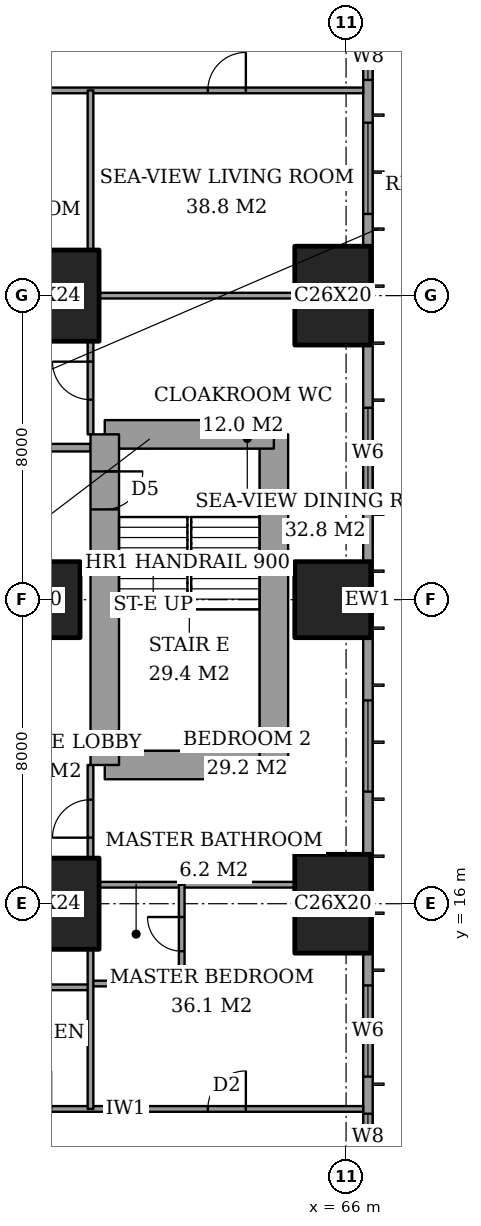
"""IFC4 building model, lengths in metres.
Left out: names, types, materials, properties, quantities, classifications, styles, units other than length and angle.
Written with IfcOpenShell. Run it as: python <this file> out.ifc"""

import sys

from ifc_helpers import new_model, si_unit, direction, frame, frame_2d, origin, origin_2d, place, context, subcontext, project, spatial, rectangle, extrude, element, fill, save


model = new_model("IFC4")
c1 = context("Model", 3, precision=1e-05, world=origin(), true_north=direction((0.0, 1.0)))
c2 = subcontext(c1, "Body", "Model", "MODEL_VIEW")
j1 = project(units=[si_unit("LENGTHUNIT", "METRE"), si_unit("PLANEANGLEUNIT", "RADIAN")], contexts=[c1])
p1 = place(None, origin())
s1 = spatial("IfcSite", under=j1, at=p1, CompositionType="ELEMENT")
p2 = place(p1, origin())
s2 = spatial("IfcBuilding", under=s1, at=p2, CompositionType="ELEMENT")
p3 = place(p2, frame((0.0, 0.0, 36.8)))
s3 = spatial("IfcBuildingStorey", under=s2, at=p3, CompositionType="ELEMENT", Elevation=36.8)
p4 = place(p3, frame((58.0, 16.0, 0.0), z_axis=(0.0, 0.0, 1.0), x_axis=(1.0, 0.0, 0.0)))
e1 = element("IfcColumn", 1, at=p4, inside=s3, PredefinedType="COLUMN", context=c2, shape_type="SweptSolid", body=[
    extrude(rectangle(XDim=3.0, YDim=2.4, at=origin_2d()), origin(), (0.0, 0.0, 1.0), 3.6),
])
p5 = place(p3, frame((58.0, 24.0, 0.0), z_axis=(0.0, 0.0, 1.0), x_axis=(1.0, 0.0, 0.0)))
e2 = element("IfcColumn", 2, at=p5, inside=s3, PredefinedType="COLUMN", context=c2, shape_type="SweptSolid", body=[
    extrude(rectangle(XDim=2.0, YDim=2.0, at=origin_2d()), origin(), (0.0, 0.0, 1.0), 3.6),
])
p6 = place(p3, frame((58.0, 32.0, 0.0), z_axis=(0.0, 0.0, 1.0), x_axis=(1.0, 0.0, 0.0)))
e3 = element("IfcColumn", 3, at=p6, inside=s3, PredefinedType="COLUMN", context=c2, shape_type="SweptSolid", body=[
    extrude(rectangle(XDim=3.0, YDim=2.4, at=origin_2d()), origin(), (0.0, 0.0, 1.0), 3.6),
])
p7 = place(p3, frame((65.65, 16.0, 0.0), z_axis=(0.0, 0.0, 1.0), x_axis=(0.0, 1.0, 0.0)))
e4 = element("IfcColumn", 4, at=p7, inside=s3, PredefinedType="COLUMN", context=c2, shape_type="SweptSolid", body=[
    extrude(rectangle(XDim=2.6, YDim=2.0, at=origin_2d()), origin(), (0.0, 0.0, 1.0), 3.6),
])
p8 = place(p3, frame((65.65, 24.0, 0.0), z_axis=(0.0, 0.0, 1.0), x_axis=(1.0, 0.0, 0.0)))
e5 = element("IfcColumn", 5, at=p8, inside=s3, PredefinedType="COLUMN", context=c2, shape_type="SweptSolid", body=[
    extrude(rectangle(XDim=2.0, YDim=2.0, at=origin_2d()), origin(), (0.0, 0.0, 1.0), 3.6),
])
p9 = place(p3, frame((65.65, 32.0, 0.0), z_axis=(0.0, 0.0, 1.0), x_axis=(0.0, 1.0, 0.0)))
e6 = element("IfcColumn", 6, at=p9, inside=s3, PredefinedType="COLUMN", context=c2, shape_type="SweptSolid", body=[
    extrude(rectangle(XDim=2.6, YDim=2.0, at=origin_2d()), origin(), (0.0, 0.0, 1.0), 3.6),
])
p10 = place(p3, frame((59.65, 19.65, 0.0), z_axis=(0.0, 0.0, 1.0), x_axis=(1.0, 0.0, 0.0)))
e7 = element("IfcWall", 7, at=p10, inside=s3, PredefinedType="SHEAR", context=c2, shape_type="SweptSolid", body=[
    extrude(rectangle(XDim=4.45, YDim=0.75, at=frame_2d((2.225, 0.0))), origin(), (0.0, 0.0, 1.0), 3.6),
])
p11 = place(p3, frame((64.1, 19.65, 0.0), z_axis=(0.0, 0.0, 1.0), x_axis=(0.0, 1.0, 0.0)))
e8 = element("IfcWall", 8, at=p11, inside=s3, PredefinedType="SHEAR", context=c2, shape_type="SweptSolid", body=[
    extrude(rectangle(XDim=8.7, YDim=0.75, at=frame_2d((4.35, 0.0))), origin(), (0.0, 0.0, 1.0), 3.6),
])
p12 = place(p3, frame((64.1, 28.35, 0.0), z_axis=(0.0, 0.0, 1.0), x_axis=(-1.0, 0.0, 0.0)))
e9 = element("IfcWall", 9, at=p12, inside=s3, PredefinedType="SHEAR", context=c2, shape_type="SweptSolid", body=[
    extrude(rectangle(XDim=4.45, YDim=0.75, at=frame_2d((2.225, 0.0))), origin(), (0.0, 0.0, 1.0), 3.6),
])
p13 = place(p3, frame((59.65, 28.35, 0.0), z_axis=(0.0, 0.0, 1.0), x_axis=(0.0, -1.0, 0.0)))
e10 = element("IfcWall", 10, at=p13, inside=s3, PredefinedType="SHEAR", context=c2, shape_type="SweptSolid", body=[
    extrude(rectangle(XDim=8.7, YDim=0.75, at=frame_2d((4.35, 0.0))), origin(), (0.0, 0.0, 1.0), 3.6),
])
p14 = place(p13, frame((0.975, 0.0, 0.0)))
e11 = element("IfcOpeningElement", 11, at=p14, cuts=e10, PredefinedType="OPENING", context=c2, shape_type="SweptSolid", body=[
    extrude(rectangle(XDim=1.0, YDim=2.1, at=frame_2d((0.5, 1.05))), frame((0.0, 0.385, 0.0), z_axis=(0.0, -1.0, 0.0), x_axis=(1.0, 0.0, 0.0)), (0.0, 0.0, 1.0), 0.77),
])
p15 = place(p3, frame((66.575, 3.175, 0.0), z_axis=(0.0, 0.0, 1.0), x_axis=(0.0, 1.0, 0.0)))
e12 = element("IfcWall", 12, at=p15, inside=s3, PredefinedType="SOLIDWALL", context=c2, shape_type="SweptSolid", body=[
    extrude(rectangle(XDim=41.65, YDim=0.25, at=frame_2d((20.825, 0.0))), origin(), (0.0, 0.0, 1.0), 3.6),
])
p16 = place(p15, frame((0.775, 0.0, 0.6)))
e13 = element("IfcOpeningElement", 13, at=p16, cuts=e12, PredefinedType="OPENING", context=c2, shape_type="SweptSolid", body=[
    extrude(rectangle(XDim=2.4, YDim=2.0, at=frame_2d((1.2, 1.0))), frame((0.0, 0.135, 0.0), z_axis=(0.0, -1.0, 0.0), x_axis=(1.0, 0.0, 0.0)), (0.0, 0.0, 1.0), 0.27),
])
p17 = place(p15, frame((6.1, 0.0, 0.6)))
e14 = element("IfcOpeningElement", 14, at=p17, cuts=e12, PredefinedType="OPENING", context=c2, shape_type="SweptSolid", body=[
    extrude(rectangle(XDim=1.2, YDim=2.0, at=frame_2d((0.6, 1.0))), frame((0.0, 0.135, 0.0), z_axis=(0.0, -1.0, 0.0), x_axis=(1.0, 0.0, 0.0)), (0.0, 0.0, 1.0), 0.27),
])
p18 = place(p15, frame((8.275, 0.0, 0.6)))
e15 = element("IfcOpeningElement", 15, at=p18, cuts=e12, PredefinedType="OPENING", context=c2, shape_type="SweptSolid", body=[
    extrude(rectangle(XDim=2.4, YDim=2.0, at=frame_2d((1.2, 1.0))), frame((0.0, 0.135, 0.0), z_axis=(0.0, -1.0, 0.0), x_axis=(1.0, 0.0, 0.0)), (0.0, 0.0, 1.0), 0.27),
])
p19 = place(p15, frame((15.775, 0.0, 0.6)))
e16 = element("IfcOpeningElement", 16, at=p19, cuts=e12, PredefinedType="OPENING", context=c2, shape_type="SweptSolid", body=[
    extrude(rectangle(XDim=2.4, YDim=2.0, at=frame_2d((1.2, 1.0))), frame((0.0, 0.135, 0.0), z_axis=(0.0, -1.0, 0.0), x_axis=(1.0, 0.0, 0.0)), (0.0, 0.0, 1.0), 0.27),
])
p20 = place(p15, frame((23.475, 0.0, 0.6)))
e17 = element("IfcOpeningElement", 17, at=p20, cuts=e12, PredefinedType="OPENING", context=c2, shape_type="SweptSolid", body=[
    extrude(rectangle(XDim=2.4, YDim=2.0, at=frame_2d((1.2, 1.0))), frame((0.0, 0.135, 0.0), z_axis=(0.0, -1.0, 0.0), x_axis=(1.0, 0.0, 0.0)), (0.0, 0.0, 1.0), 0.27),
])
p21 = place(p15, frame((30.975, 0.0, 0.6)))
e18 = element("IfcOpeningElement", 18, at=p21, cuts=e12, PredefinedType="OPENING", context=c2, shape_type="SweptSolid", body=[
    extrude(rectangle(XDim=2.4, YDim=2.0, at=frame_2d((1.2, 1.0))), frame((0.0, 0.135, 0.0), z_axis=(0.0, -1.0, 0.0), x_axis=(1.0, 0.0, 0.0)), (0.0, 0.0, 1.0), 0.27),
])
p22 = place(p15, frame((34.5, 0.0, 0.6)))
e19 = element("IfcOpeningElement", 19, at=p22, cuts=e12, PredefinedType="OPENING", context=c2, shape_type="SweptSolid", body=[
    extrude(rectangle(XDim=1.2, YDim=2.0, at=frame_2d((0.6, 1.0))), frame((0.0, 0.135, 0.0), z_axis=(0.0, -1.0, 0.0), x_axis=(1.0, 0.0, 0.0)), (0.0, 0.0, 1.0), 0.27),
])
p23 = place(p15, frame((38.475, 0.0, 0.6)))
e20 = element("IfcOpeningElement", 20, at=p23, cuts=e12, PredefinedType="OPENING", context=c2, shape_type="SweptSolid", body=[
    extrude(rectangle(XDim=2.4, YDim=2.0, at=frame_2d((1.2, 1.0))), frame((0.0, 0.135, 0.0), z_axis=(0.0, -1.0, 0.0), x_axis=(1.0, 0.0, 0.0)), (0.0, 0.0, 1.0), 0.27),
])
p24 = place(p3, frame((41.439, 10.6, 0.0), z_axis=(0.0, 0.0, 1.0), x_axis=(1.0, 0.0, 0.0)))
e21 = element("IfcWall", 21, at=p24, inside=s3, PredefinedType="PARTITIONING", context=c2, shape_type="SweptSolid", body=[
    extrude(rectangle(XDim=25.011, YDim=0.15, at=frame_2d((12.505, 0.0))), origin(), (0.0, 0.0, 1.0), 3.35),
])
p25 = place(p24, frame((10.761, 0.0, 0.0)))
e22 = element("IfcOpeningElement", 22, at=p25, cuts=e21, PredefinedType="OPENING", context=c2, shape_type="SweptSolid", body=[
    extrude(rectangle(XDim=1.0, YDim=2.1, at=frame_2d((0.5, 1.05))), frame((0.0, 0.085, 0.0), z_axis=(0.0, -1.0, 0.0), x_axis=(1.0, 0.0, 0.0)), (0.0, 0.0, 1.0), 0.17),
])
p26 = place(p24, frame((20.924, 0.0, 0.0)))
e23 = element("IfcOpeningElement", 23, at=p26, cuts=e21, PredefinedType="OPENING", context=c2, shape_type="SweptSolid", body=[
    extrude(rectangle(XDim=1.0, YDim=2.1, at=frame_2d((0.5, 1.05))), frame((0.0, 0.085, 0.0), z_axis=(0.0, -1.0, 0.0), x_axis=(1.0, 0.0, 0.0)), (0.0, 0.0, 1.0), 0.17),
])
p27 = place(p24, frame((15.799, 0.0, 0.0)))
e24 = element("IfcOpeningElement", 24, at=p27, cuts=e21, PredefinedType="OPENING", context=c2, shape_type="SweptSolid", body=[
    extrude(rectangle(XDim=1.0, YDim=2.1, at=frame_2d((0.5, 1.05))), frame((0.0, 0.085, 0.0), z_axis=(0.0, -1.0, 0.0), x_axis=(1.0, 0.0, 0.0)), (0.0, 0.0, 1.0), 0.17),
])
p28 = place(p24, frame((13.061, 0.0, 0.0)))
e25 = element("IfcOpeningElement", 25, at=p28, cuts=e21, PredefinedType="OPENING", context=c2, shape_type="SweptSolid", body=[
    extrude(rectangle(XDim=1.0, YDim=2.1, at=frame_2d((0.5, 1.05))), frame((0.0, 0.085, 0.0), z_axis=(0.0, -1.0, 0.0), x_axis=(1.0, 0.0, 0.0)), (0.0, 0.0, 1.0), 0.17),
])
p29 = place(p24, frame((7.911, 0.0, 0.0)))
e26 = element("IfcOpeningElement", 26, at=p29, cuts=e21, PredefinedType="OPENING", context=c2, shape_type="SweptSolid", body=[
    extrude(rectangle(XDim=0.9, YDim=2.1, at=frame_2d((0.45, 1.05))), frame((0.0, 0.085, 0.0), z_axis=(0.0, -1.0, 0.0), x_axis=(1.0, 0.0, 0.0)), (0.0, 0.0, 1.0), 0.17),
])
p30 = place(p24, frame((2.836, 0.0, 0.0)))
e27 = element("IfcOpeningElement", 27, at=p30, cuts=e21, PredefinedType="OPENING", context=c2, shape_type="SweptSolid", body=[
    extrude(rectangle(XDim=1.0, YDim=2.1, at=frame_2d((0.5, 1.05))), frame((0.0, 0.085, 0.0), z_axis=(0.0, -1.0, 0.0), x_axis=(1.0, 0.0, 0.0)), (0.0, 0.0, 1.0), 0.17),
])
p31 = place(p3, frame((56.2, 13.8, 0.0), z_axis=(0.0, 0.0, 1.0), x_axis=(1.0, 0.0, 0.0)))
e28 = element("IfcWall", 28, at=p31, inside=s3, PredefinedType="PARTITIONING", context=c2, shape_type="SweptSolid", body=[
    extrude(rectangle(XDim=3.075, YDim=0.15, at=frame_2d((1.538, 0.0))), origin(), (0.0, 0.0, 1.0), 3.35),
])
p32 = place(p3, frame((59.275, 13.9, 0.0), z_axis=(0.0, 0.0, 1.0), x_axis=(1.0, 0.0, 0.0)))
e29 = element("IfcWall", 29, at=p32, inside=s3, PredefinedType="PARTITIONING", context=c2, shape_type="SweptSolid", body=[
    extrude(rectangle(XDim=2.4, YDim=0.15, at=frame_2d((1.2, 0.0))), origin(), (0.0, 0.0, 1.0), 3.35),
])
p33 = place(p3, frame((59.5, 16.5, 0.0), z_axis=(0.0, 0.0, 1.0), x_axis=(1.0, 0.0, 0.0)))
e30 = element("IfcWall", 30, at=p33, inside=s3, PredefinedType="PARTITIONING", context=c2, shape_type="SweptSolid", body=[
    extrude(rectangle(XDim=5.15, YDim=0.15, at=frame_2d((2.575, 0.0))), origin(), (0.0, 0.0, 1.0), 3.35),
])
p34 = place(p3, frame((42.0, 28.0, 0.0), z_axis=(0.0, 0.0, 1.0), x_axis=(1.0, 0.0, 0.0)))
e31 = element("IfcWall", 31, at=p34, inside=s3, PredefinedType="PARTITIONING", context=c2, shape_type="SweptSolid", body=[
    extrude(rectangle(XDim=17.275, YDim=0.2, at=frame_2d((8.637, 0.0))), origin(), (0.0, 0.0, 1.0), 3.35),
])
p35 = place(p34, frame((9.4, 0.0, 0.0)))
e32 = element("IfcOpeningElement", 32, at=p35, cuts=e31, PredefinedType="OPENING", context=c2, shape_type="SweptSolid", body=[
    extrude(rectangle(XDim=1.2, YDim=2.4, at=frame_2d((0.6, 1.2))), frame((0.0, 0.11, 0.0), z_axis=(0.0, -1.0, 0.0), x_axis=(1.0, 0.0, 0.0)), (0.0, 0.0, 1.0), 0.22),
])
p36 = place(p3, frame((59.5, 32.0, 0.0), z_axis=(0.0, 0.0, 1.0), x_axis=(1.0, 0.0, 0.0)))
e33 = element("IfcWall", 33, at=p36, inside=s3, PredefinedType="PARTITIONING", context=c2, shape_type="SweptSolid", body=[
    extrude(rectangle(XDim=5.15, YDim=0.15, at=frame_2d((2.575, 0.0))), origin(), (0.0, 0.0, 1.0), 2.634),
])
p37 = place(p3, frame((41.439, 37.4, 0.0), z_axis=(0.0, 0.0, 1.0), x_axis=(1.0, 0.0, 0.0)))
e34 = element("IfcWall", 34, at=p37, inside=s3, PredefinedType="PARTITIONING", context=c2, shape_type="SweptSolid", body=[
    extrude(rectangle(XDim=25.011, YDim=0.15, at=frame_2d((12.505, 0.0))), origin(), (0.0, 0.0, 1.0), 3.35),
])
p38 = place(p37, frame((10.761, 0.0, 0.0)))
e35 = element("IfcOpeningElement", 35, at=p38, cuts=e34, PredefinedType="OPENING", context=c2, shape_type="SweptSolid", body=[
    extrude(rectangle(XDim=1.0, YDim=2.1, at=frame_2d((0.5, 1.05))), frame((0.0, 0.085, 0.0), z_axis=(0.0, -1.0, 0.0), x_axis=(1.0, 0.0, 0.0)), (0.0, 0.0, 1.0), 0.17),
])
p39 = place(p37, frame((20.924, 0.0, 0.0)))
e36 = element("IfcOpeningElement", 36, at=p39, cuts=e34, PredefinedType="OPENING", context=c2, shape_type="SweptSolid", body=[
    extrude(rectangle(XDim=1.0, YDim=2.1, at=frame_2d((0.5, 1.05))), frame((0.0, 0.085, 0.0), z_axis=(0.0, -1.0, 0.0), x_axis=(1.0, 0.0, 0.0)), (0.0, 0.0, 1.0), 0.17),
])
p40 = place(p37, frame((15.749, 0.0, 0.0)))
e37 = element("IfcOpeningElement", 37, at=p40, cuts=e34, PredefinedType="OPENING", context=c2, shape_type="SweptSolid", body=[
    extrude(rectangle(XDim=0.9, YDim=2.1, at=frame_2d((0.45, 1.05))), frame((0.0, 0.085, 0.0), z_axis=(0.0, -1.0, 0.0), x_axis=(1.0, 0.0, 0.0)), (0.0, 0.0, 1.0), 0.17),
])
p41 = place(p37, frame((12.961, 0.0, 0.0)))
e38 = element("IfcOpeningElement", 38, at=p41, cuts=e34, PredefinedType="OPENING", context=c2, shape_type="SweptSolid", body=[
    extrude(rectangle(XDim=1.0, YDim=2.1, at=frame_2d((0.5, 1.05))), frame((0.0, 0.085, 0.0), z_axis=(0.0, -1.0, 0.0), x_axis=(1.0, 0.0, 0.0)), (0.0, 0.0, 1.0), 0.17),
])
p42 = place(p37, frame((7.861, 0.0, 0.0)))
e39 = element("IfcOpeningElement", 39, at=p42, cuts=e34, PredefinedType="OPENING", context=c2, shape_type="SweptSolid", body=[
    extrude(rectangle(XDim=1.0, YDim=2.1, at=frame_2d((0.5, 1.05))), frame((0.0, 0.085, 0.0), z_axis=(0.0, -1.0, 0.0), x_axis=(1.0, 0.0, 0.0)), (0.0, 0.0, 1.0), 0.17),
])
p43 = place(p37, frame((2.836, 0.0, 0.0)))
e40 = element("IfcOpeningElement", 40, at=p43, cuts=e34, PredefinedType="OPENING", context=c2, shape_type="SweptSolid", body=[
    extrude(rectangle(XDim=1.0, YDim=2.1, at=frame_2d((0.5, 1.05))), frame((0.0, 0.085, 0.0), z_axis=(0.0, -1.0, 0.0), x_axis=(1.0, 0.0, 0.0)), (0.0, 0.0, 1.0), 0.17),
])
p44 = place(p3, frame((59.275, 10.6, 0.0), z_axis=(0.0, 0.0, 1.0), x_axis=(0.0, 1.0, 0.0)))
e41 = element("IfcWall", 41, at=p44, inside=s3, PredefinedType="PARTITIONING", context=c2, shape_type="SweptSolid", body=[
    extrude(rectangle(XDim=4.2, YDim=0.15, at=frame_2d((2.1, 0.0))), origin(), (0.0, 0.0, 1.0), 3.35),
])
p45 = place(p3, frame((59.275, 17.2, 0.0), z_axis=(0.0, 0.0, 1.0), x_axis=(0.0, 1.0, 0.0)))
e42 = element("IfcWall", 42, at=p45, inside=s3, PredefinedType="PARTITIONING", context=c2, shape_type="SweptSolid", body=[
    extrude(rectangle(XDim=2.45, YDim=0.15, at=frame_2d((1.225, 0.0))), origin(), (0.0, 0.0, 1.0), 3.35),
])
p46 = place(p45, frame((0.538, 0.0, 0.0)))
e43 = element("IfcOpeningElement", 43, at=p46, cuts=e42, PredefinedType="OPENING", context=c2, shape_type="SweptSolid", body=[
    extrude(rectangle(XDim=1.0, YDim=2.1, at=frame_2d((0.5, 1.05))), frame((0.0, 0.085, 0.0), z_axis=(0.0, -1.0, 0.0), x_axis=(1.0, 0.0, 0.0)), (0.0, 0.0, 1.0), 0.17),
])
p47 = place(p3, frame((59.275, 28.35, 0.0), z_axis=(0.0, 0.0, 1.0), x_axis=(0.0, 1.0, 0.0)))
e44 = element("IfcWall", 44, at=p47, inside=s3, PredefinedType="PARTITIONING", context=c2, shape_type="SweptSolid", body=[
    extrude(rectangle(XDim=2.45, YDim=0.15, at=frame_2d((1.225, 0.0))), origin(), (0.0, 0.0, 1.0), 3.35),
])
p48 = place(p47, frame((0.913, 0.0, 0.0)))
e45 = element("IfcOpeningElement", 45, at=p48, cuts=e44, PredefinedType="OPENING", context=c2, shape_type="SweptSolid", body=[
    extrude(rectangle(XDim=1.0, YDim=2.1, at=frame_2d((0.5, 1.05))), frame((0.0, 0.085, 0.0), z_axis=(0.0, -1.0, 0.0), x_axis=(1.0, 0.0, 0.0)), (0.0, 0.0, 1.0), 0.17),
])
p49 = place(p3, frame((59.275, 33.2, 0.0), z_axis=(0.0, 0.0, 1.0), x_axis=(0.0, 1.0, 0.0)))
e46 = element("IfcWall", 46, at=p49, inside=s3, PredefinedType="PARTITIONING", context=c2, shape_type="SweptSolid", body=[
    extrude(rectangle(XDim=4.2, YDim=0.15, at=frame_2d((2.1, 0.0))), origin(), (0.0, 0.0, 1.0), 3.35),
])
p50 = place(p3, frame((61.675, 13.9, 0.0), z_axis=(0.0, 0.0, 1.0), x_axis=(0.0, 1.0, 0.0)))
e47 = element("IfcWall", 47, at=p50, inside=s3, PredefinedType="PARTITIONING", context=c2, shape_type="SweptSolid", body=[
    extrude(rectangle(XDim=2.6, YDim=0.15, at=frame_2d((1.3, 0.0))), origin(), (0.0, 0.0, 1.0), 3.35),
])
p51 = place(p50, frame((0.85, 0.0, 0.0)))
e48 = element("IfcOpeningElement", 48, at=p51, cuts=e47, PredefinedType="OPENING", context=c2, shape_type="SweptSolid", body=[
    extrude(rectangle(XDim=0.9, YDim=2.1, at=frame_2d((0.45, 1.05))), frame((0.0, 0.085, 0.0), z_axis=(0.0, -1.0, 0.0), x_axis=(1.0, 0.0, 0.0)), (0.0, 0.0, 1.0), 0.17),
])
p52 = place(p17, origin())
e49 = element("IfcWindow", 49, at=p52, inside=s3, PartitioningType="SINGLE_PANEL", PredefinedType="WINDOW", context=c2, shape_type="SweptSolid", body=[
    extrude(rectangle(XDim=1.2, YDim=2.0, at=frame_2d((0.6, 1.0))), frame((0.0, 0.03, 0.0), z_axis=(0.0, -1.0, 0.0), x_axis=(1.0, 0.0, 0.0)), (0.0, 0.0, 1.0), 0.06),
])
fill(e14, e49)
p53 = place(p18, origin())
e50 = element("IfcWindow", 50, at=p53, inside=s3, PartitioningType="SINGLE_PANEL", PredefinedType="WINDOW", context=c2, shape_type="SweptSolid", body=[
    extrude(rectangle(XDim=2.4, YDim=2.0, at=frame_2d((1.2, 1.0))), frame((0.0, 0.03, 0.0), z_axis=(0.0, -1.0, 0.0), x_axis=(1.0, 0.0, 0.0)), (0.0, 0.0, 1.0), 0.06),
])
fill(e15, e50)
p54 = place(p19, origin())
e51 = element("IfcWindow", 51, at=p54, inside=s3, PartitioningType="SINGLE_PANEL", PredefinedType="WINDOW", context=c2, shape_type="SweptSolid", body=[
    extrude(rectangle(XDim=2.4, YDim=2.0, at=frame_2d((1.2, 1.0))), frame((0.0, 0.03, 0.0), z_axis=(0.0, -1.0, 0.0), x_axis=(1.0, 0.0, 0.0)), (0.0, 0.0, 1.0), 0.06),
])
fill(e16, e51)
p55 = place(p20, origin())
e52 = element("IfcWindow", 52, at=p55, inside=s3, PartitioningType="SINGLE_PANEL", PredefinedType="WINDOW", context=c2, shape_type="SweptSolid", body=[
    extrude(rectangle(XDim=2.4, YDim=2.0, at=frame_2d((1.2, 1.0))), frame((0.0, 0.03, 0.0), z_axis=(0.0, -1.0, 0.0), x_axis=(1.0, 0.0, 0.0)), (0.0, 0.0, 1.0), 0.06),
])
fill(e17, e52)
p56 = place(p21, origin())
e53 = element("IfcWindow", 53, at=p56, inside=s3, PartitioningType="SINGLE_PANEL", PredefinedType="WINDOW", context=c2, shape_type="SweptSolid", body=[
    extrude(rectangle(XDim=2.4, YDim=2.0, at=frame_2d((1.2, 1.0))), frame((0.0, 0.03, 0.0), z_axis=(0.0, -1.0, 0.0), x_axis=(1.0, 0.0, 0.0)), (0.0, 0.0, 1.0), 0.06),
])
fill(e18, e53)
p57 = place(p22, origin())
e54 = element("IfcWindow", 54, at=p57, inside=s3, PartitioningType="SINGLE_PANEL", PredefinedType="WINDOW", context=c2, shape_type="SweptSolid", body=[
    extrude(rectangle(XDim=1.2, YDim=2.0, at=frame_2d((0.6, 1.0))), frame((0.0, 0.03, 0.0), z_axis=(0.0, -1.0, 0.0), x_axis=(1.0, 0.0, 0.0)), (0.0, 0.0, 1.0), 0.06),
])
fill(e19, e54)
p58 = place(p51, origin())
e55 = element("IfcDoor", 55, at=p58, inside=s3, OperationType="SINGLE_SWING_LEFT", PredefinedType="DOOR", context=c2, shape_type="SweptSolid", body=[
    extrude(rectangle(XDim=0.9, YDim=2.1, at=frame_2d((0.45, 1.05))), frame((0.0, 0.025, 0.0), z_axis=(0.0, -1.0, 0.0), x_axis=(1.0, 0.0, 0.0)), (0.0, 0.0, 1.0), 0.05),
])
fill(e48, e55)
p59 = place(p26, origin())
e56 = element("IfcDoor", 56, at=p59, inside=s3, OperationType="SINGLE_SWING_LEFT", PredefinedType="DOOR", context=c2, shape_type="SweptSolid", body=[
    extrude(rectangle(XDim=1.0, YDim=2.1, at=frame_2d((0.5, 1.05))), frame((0.0, 0.025, 0.0), z_axis=(0.0, -1.0, 0.0), x_axis=(1.0, 0.0, 0.0)), (0.0, 0.0, 1.0), 0.05),
])
fill(e23, e56)
p60 = place(p46, origin())
e57 = element("IfcDoor", 57, at=p60, inside=s3, OperationType="SINGLE_SWING_RIGHT", PredefinedType="DOOR", context=c2, shape_type="SweptSolid", body=[
    extrude(rectangle(XDim=1.0, YDim=2.1, at=frame_2d((0.5, 1.05))), frame((0.0, 0.025, 0.0), z_axis=(0.0, -1.0, 0.0), x_axis=(1.0, 0.0, 0.0)), (0.0, 0.0, 1.0), 0.05),
])
fill(e43, e57)
p61 = place(p39, origin())
e58 = element("IfcDoor", 58, at=p61, inside=s3, OperationType="SINGLE_SWING_LEFT", PredefinedType="DOOR", context=c2, shape_type="SweptSolid", body=[
    extrude(rectangle(XDim=1.0, YDim=2.1, at=frame_2d((0.5, 1.05))), frame((0.0, 0.025, 0.0), z_axis=(0.0, -1.0, 0.0), x_axis=(1.0, 0.0, 0.0)), (0.0, 0.0, 1.0), 0.05),
])
fill(e36, e58)
p62 = place(p48, origin())
e59 = element("IfcDoor", 59, at=p62, inside=s3, OperationType="SINGLE_SWING_LEFT", PredefinedType="DOOR", context=c2, shape_type="SweptSolid", body=[
    extrude(rectangle(XDim=1.0, YDim=2.1, at=frame_2d((0.5, 1.05))), frame((0.0, 0.025, 0.0), z_axis=(0.0, -1.0, 0.0), x_axis=(1.0, 0.0, 0.0)), (0.0, 0.0, 1.0), 0.05),
])
fill(e45, e59)
p63 = place(p14, origin())
e60 = element("IfcDoor", 60, at=p63, inside=s3, OperationType="SINGLE_SWING_RIGHT", PredefinedType="DOOR", context=c2, shape_type="SweptSolid", body=[
    extrude(rectangle(XDim=1.0, YDim=2.1, at=frame_2d((0.5, 1.05))), frame((0.0, 0.025, 0.0), z_axis=(0.0, -1.0, 0.0), x_axis=(1.0, 0.0, 0.0)), (0.0, 0.0, 1.0), 0.05),
])
fill(e11, e60)
save(model, sys.argv[1])
